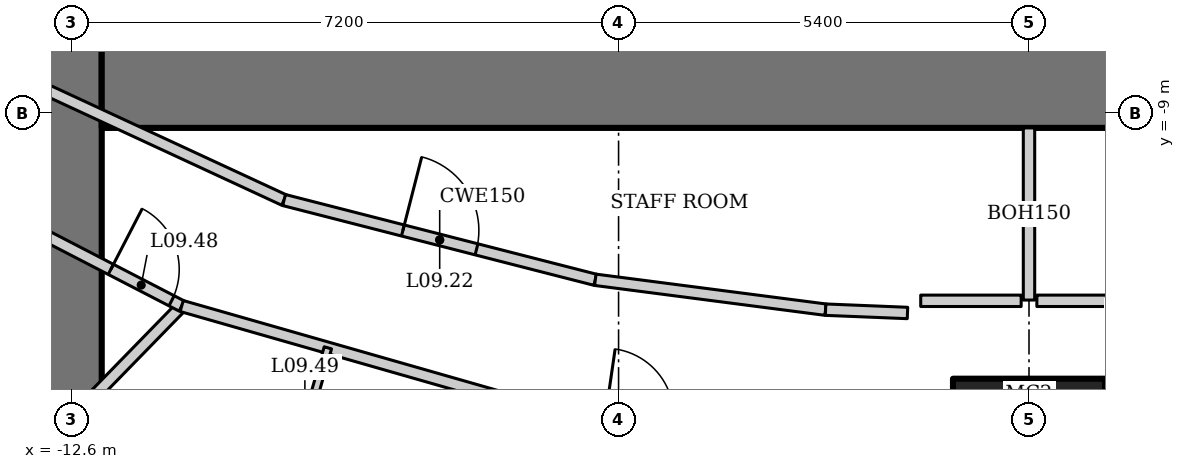
"""IFC4 building model, lengths in metres.
Left out: names, types, materials, properties, quantities, classifications, styles, units other than length and angle.
Written with IfcOpenShell. Run it as: python <this file> out.ifc"""

import sys

from ifc_helpers import new_model, si_unit, direction, frame, frame_2d, origin, origin_2d, place, context, subcontext, project, spatial, rectangle, hollow_rectangle, extrude, element, fill, save


model = new_model("IFC4")
c1 = context("Model", 3, precision=1e-05, world=origin(), true_north=direction((0.0, 1.0)))
c2 = subcontext(c1, "Body", "Model", "MODEL_VIEW")
j1 = project(units=[si_unit("LENGTHUNIT", "METRE"), si_unit("PLANEANGLEUNIT", "RADIAN")], contexts=[c1])
p1 = place(None, origin())
s1 = spatial("IfcSite", under=j1, at=p1, CompositionType="ELEMENT")
p2 = place(p1, origin())
s2 = spatial("IfcBuilding", under=s1, at=p2, CompositionType="ELEMENT")
p3 = place(p2, frame((0.0, 0.0, 47.8)))
s3 = spatial("IfcBuildingStorey", under=s2, at=p3, CompositionType="ELEMENT", Elevation=47.8)
p4 = place(p3, frame((0.0, -13.5, 0.0), z_axis=(0.0, 0.0, 1.0), x_axis=(1.0, 0.0, 0.0)))
e1 = element("IfcColumn", 1, at=p4, inside=s3, PredefinedType="COLUMN", context=c2, shape_type="SweptSolid", body=[
    extrude(hollow_rectangle(XDim=2.0, YDim=2.0, WallThickness=0.17, at=origin_2d()), origin(), (0.0, 0.0, 1.0), 3.6),
])
p5 = place(p3, frame((-13.2, 13.0, 0.0), z_axis=(0.0, 0.0, 1.0), x_axis=(0.0, -1.0, 0.0)))
e2 = element("IfcWall", 2, at=p5, inside=s3, PredefinedType="SHEAR", context=c2, shape_type="SweptSolid", body=[
    extrude(rectangle(XDim=26.0, YDim=2.0, at=frame_2d((13.0, 0.0))), origin(), (0.0, 0.0, 1.0), 3.6),
])
p6 = place(p5, frame((12.1, 0.0, 0.0)))
e3 = element("IfcOpeningElement", 3, at=p6, cuts=e2, PredefinedType="OPENING", context=c2, shape_type="SweptSolid", body=[
    extrude(rectangle(XDim=1.8, YDim=2.1, at=frame_2d((0.9, 1.05))), frame((0.0, 1.01, 0.0), z_axis=(0.0, -1.0, 0.0), x_axis=(1.0, 0.0, 0.0)), (0.0, 0.0, 1.0), 2.02),
])
p7 = place(p3, frame((-12.2, -8.0, 0.0), z_axis=(0.0, 0.0, 1.0), x_axis=(1.0, 0.0, 0.0)))
e4 = element("IfcWall", 4, at=p7, inside=s3, PredefinedType="SHEAR", context=c2, shape_type="SweptSolid", body=[
    extrude(rectangle(XDim=24.4, YDim=2.4, at=frame_2d((12.2, 0.0))), origin(), (0.0, 0.0, 1.0), 3.6),
])
p8 = place(p3, frame((-17.97, -18.542, 0.0), z_axis=(0.0, 0.0, 1.0), x_axis=(0.698095013805, 0.71600513385, 0.0)))
e5 = element("IfcWall", 5, at=p8, inside=s3, PredefinedType="PARTITIONING", context=c2, shape_type="SweptSolid", body=[
    extrude(rectangle(XDim=9.774, YDim=0.15, at=frame_2d((4.887, 0.0))), origin(), (0.0, 0.0, 1.0), 2.528),
])
p9 = place(p3, frame((-15.901, -9.086, 0.0), z_axis=(0.0, 0.0, 1.0), x_axis=(0.888333171507, -0.459199495209, 0.0)))
e6 = element("IfcWall", 6, at=p9, inside=s3, PredefinedType="PARTITIONING", context=c2, shape_type="SweptSolid", body=[
    extrude(rectangle(XDim=5.351, YDim=0.15, at=frame_2d((2.676, 0.0))), origin(), (0.0, 0.0, 1.0), 3.45),
])
p10 = place(p9, frame((4.301, 0.0, 0.0)))
e7 = element("IfcOpeningElement", 7, at=p10, cuts=e6, PredefinedType="OPENING", context=c2, shape_type="SweptSolid", body=[
    extrude(rectangle(XDim=0.9, YDim=2.1, at=frame_2d((0.45, 1.05))), frame((0.0, 0.085, 0.0), z_axis=(0.0, -1.0, 0.0), x_axis=(1.0, 0.0, 0.0)), (0.0, 0.0, 1.0), 0.17),
])
p11 = place(p3, frame((-11.147, -11.544, 0.0), z_axis=(0.0, 0.0, 1.0), x_axis=(0.961464178199, -0.27493023486, 0.0)))
e8 = element("IfcWall", 8, at=p11, inside=s3, PredefinedType="PARTITIONING", context=c2, shape_type="SweptSolid", body=[
    extrude(rectangle(XDim=4.78, YDim=0.15, at=frame_2d((2.39, 0.0))), origin(), (0.0, 0.0, 1.0), 3.45),
])
p12 = place(p3, frame((-14.196, -8.112, 0.0), z_axis=(0.0, 0.0, 1.0), x_axis=(0.907279653965, -0.420527798727, 0.0)))
e9 = element("IfcWall", 9, at=p12, inside=s3, PredefinedType="PARTITIONING", context=c2, shape_type="SweptSolid", body=[
    extrude(rectangle(XDim=4.844, YDim=0.15, at=frame_2d((2.422, 0.0))), origin(), (0.0, 0.0, 1.0), 3.45),
])
p13 = place(p3, frame((-9.801, -10.149, 0.0), z_axis=(0.0, 0.0, 1.0), x_axis=(0.968705891355, -0.248211393886, 0.0)))
e10 = element("IfcWall", 10, at=p13, inside=s3, PredefinedType="PARTITIONING", context=c2, shape_type="SweptSolid", body=[
    extrude(rectangle(XDim=4.228, YDim=0.15, at=frame_2d((2.114, 0.0))), origin(), (0.0, 0.0, 1.0), 3.45),
])
p14 = place(p13, frame((1.614, 0.0, 0.0)))
e11 = element("IfcOpeningElement", 11, at=p14, cuts=e10, PredefinedType="OPENING", context=c2, shape_type="SweptSolid", body=[
    extrude(rectangle(XDim=1.0, YDim=2.1, at=frame_2d((0.5, 1.05))), frame((0.0, 0.085, 0.0), z_axis=(0.0, -1.0, 0.0), x_axis=(1.0, 0.0, 0.0)), (0.0, 0.0, 1.0), 0.17),
])
p15 = place(p3, frame((-5.706, -11.198, 0.0), z_axis=(0.0, 0.0, 1.0), x_axis=(0.99168929531, -0.128655903743, 0.0)))
e12 = element("IfcWall", 12, at=p15, inside=s3, PredefinedType="PARTITIONING", context=c2, shape_type="SweptSolid", body=[
    extrude(rectangle(XDim=3.055, YDim=0.15, at=frame_2d((1.528, 0.0))), origin(), (0.0, 0.0, 1.0), 3.45),
])
p16 = place(p3, frame((-9.225, -12.094, 0.0), z_axis=(0.0, 0.0, 1.0), x_axis=(-0.274949510627, -0.961458666093, 0.0)))
e13 = element("IfcWall", 13, at=p16, inside=s3, PredefinedType="PARTITIONING", context=c2, shape_type="SweptSolid", body=[
    extrude(rectangle(XDim=2.4, YDim=0.1, at=frame_2d((1.2, 0.0))), origin(), (0.0, 0.0, 1.0), 3.45),
])
p17 = place(p16, frame((0.7, 0.0, 0.0)))
e14 = element("IfcOpeningElement", 14, at=p17, cuts=e13, PredefinedType="OPENING", context=c2, shape_type="SweptSolid", body=[
    extrude(rectangle(XDim=0.8, YDim=2.1, at=frame_2d((0.4, 1.05))), frame((0.0, 0.06, 0.0), z_axis=(0.0, -1.0, 0.0), x_axis=(1.0, 0.0, 0.0)), (0.0, 0.0, 1.0), 0.12),
])
p18 = place(p3, frame((-2.676, -11.592, 0.0), z_axis=(0.0, 0.0, 1.0), x_axis=(0.999178004727, -0.040537820228, 0.0)))
e15 = element("IfcWall", 15, at=p18, inside=s3, PredefinedType="PARTITIONING", context=c2, shape_type="SweptSolid", body=[
    extrude(rectangle(XDim=1.078, YDim=0.15, at=frame_2d((0.539, 0.0))), origin(), (0.0, 0.0, 1.0), 3.45),
])
p19 = place(p3, frame((0.0, -9.2, 0.0), z_axis=(0.0, 0.0, 1.0), x_axis=(0.0, -1.0, 0.0)))
e16 = element("IfcWall", 16, at=p19, inside=s3, PredefinedType="PARTITIONING", context=c2, shape_type="SweptSolid", body=[
    extrude(rectangle(XDim=2.265, YDim=0.15, at=frame_2d((1.133, 0.0))), origin(), (0.0, 0.0, 1.0), 3.043),
])
for number, where, z_axis, x_axis in (
    (17, (-1.425, -11.475, 0.0), (0.0, 0.0, 1.0), (1.0, 0.0, 0.0)),
    (18, (0.103, -11.475, 0.0), (0.0, 0.0, 1.0), (1.0, 0.0, 0.0)),
):
    element("IfcWall", number, at=place(p3, frame(where, z_axis=z_axis, x_axis=x_axis)), inside=s3, PredefinedType="PARTITIONING", context=c2, shape_type="SweptSolid", body=[
        extrude(rectangle(XDim=1.321, YDim=0.15, at=frame_2d((0.661, 0.0))), origin(), (0.0, 0.0, 1.0), 3.45),
    ])
p20 = place(p14, origin())
e19 = element("IfcDoor", 19, at=p20, inside=s3, OperationType="SINGLE_SWING_LEFT", PredefinedType="DOOR", context=c2, shape_type="SweptSolid", body=[
    extrude(rectangle(XDim=1.0, YDim=2.1, at=frame_2d((0.5, 1.05))), frame((0.0, 0.025, 0.0), z_axis=(0.0, -1.0, 0.0), x_axis=(1.0, 0.0, 0.0)), (0.0, 0.0, 1.0), 0.05),
])
fill(e11, e19)
p21 = place(p10, origin())
e20 = element("IfcDoor", 20, at=p21, inside=s3, OperationType="SINGLE_SWING_LEFT", PredefinedType="DOOR", context=c2, shape_type="SweptSolid", body=[
    extrude(rectangle(XDim=0.9, YDim=2.1, at=frame_2d((0.45, 1.05))), frame((0.0, 0.025, 0.0), z_axis=(0.0, -1.0, 0.0), x_axis=(1.0, 0.0, 0.0)), (0.0, 0.0, 1.0), 0.05),
])
fill(e7, e20)
save(model, sys.argv[1])
